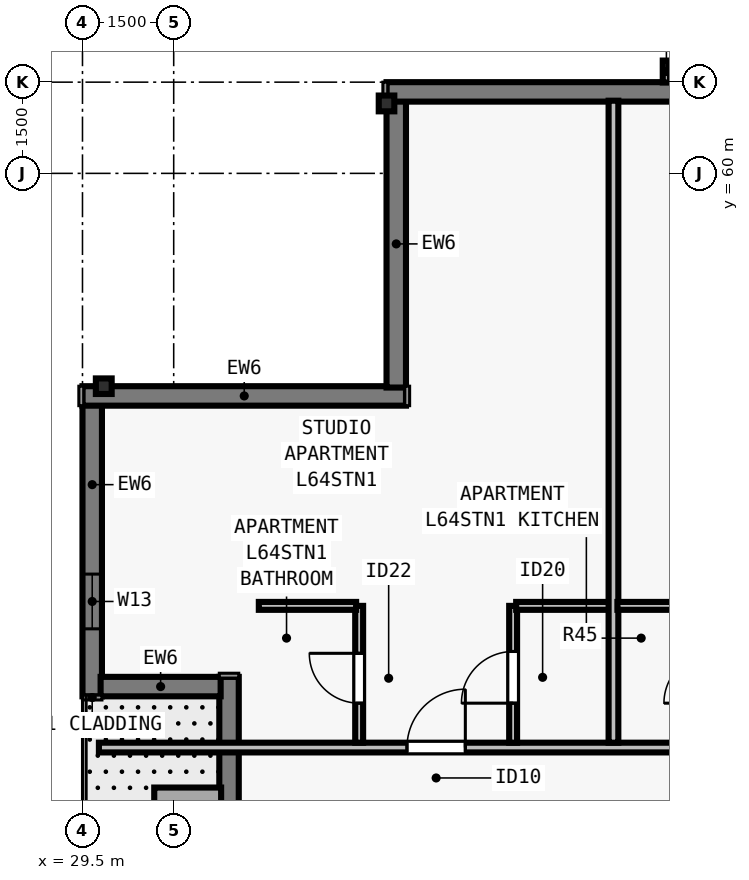
"""IFC4 building model, lengths in metres.
Left out: names, types, materials, properties, quantities, classifications, styles, units other than length and angle.
Written with IfcOpenShell. Run it as: python <this file> out.ifc"""

import sys

from ifc_helpers import new_model, si_unit, direction, frame, frame_2d, origin, origin_2d, place, context, subcontext, project, spatial, rectangle, i_section, extrude, element, fill, save


model = new_model("IFC4")
c1 = context("Model", 3, precision=1e-05, world=origin(), true_north=direction((0.0, 1.0)))
c2 = subcontext(c1, "Body", "Model", "MODEL_VIEW")
j1 = project(units=[si_unit("LENGTHUNIT", "METRE"), si_unit("PLANEANGLEUNIT", "RADIAN")], contexts=[c1])
p1 = place(None, origin())
s1 = spatial("IfcSite", under=j1, at=p1, CompositionType="ELEMENT")
p2 = place(p1, origin())
s2 = spatial("IfcBuilding", under=s1, at=p2, CompositionType="ELEMENT")
p3 = place(p2, frame((0.0, 0.0, 234.0)))
s3 = spatial("IfcBuildingStorey", under=s2, at=p3, CompositionType="ELEMENT", Elevation=234.0)
for number, where, z_axis, x_axis in (
    (1, (34.5, 61.15, 0.0), (0.0, 0.0, 1.0), (1.0, 0.0, 0.0)),
    (2, (29.85, 56.5, 0.0), (0.0, 0.0, 1.0), (0.0, 1.0, 0.0)),
):
    element("IfcColumn", number, at=place(p3, frame(where, z_axis=z_axis, x_axis=x_axis)), inside=s3, PredefinedType="COLUMN", context=c2, shape_type="SweptSolid", body=[
        extrude(i_section(OverallWidth=0.256, OverallDepth=0.26, WebThickness=0.01, FlangeThickness=0.017, FilletRadius=0.013, at=origin_2d()), origin(), (0.0, 0.0, 1.0), 3.5),
    ])
p4 = place(p3, frame((29.66, 51.4, 0.0), z_axis=(0.0, 0.0, 1.0), x_axis=(0.0, 1.0, 0.0)))
e3 = element("IfcWall", 3, at=p4, inside=s3, PredefinedType="SOLIDWALL", context=c2, shape_type="SweptSolid", body=[
    extrude(rectangle(XDim=4.802, YDim=0.32, at=frame_2d((2.401, 0.0))), origin(), (0.0, 0.0, 1.0), 3.29),
])
p5 = place(p4, frame((1.11, 0.0, 0.8)))
e4 = element("IfcOpeningElement", 4, at=p5, cuts=e3, PredefinedType="OPENING", context=c2, shape_type="SweptSolid", body=[
    extrude(rectangle(XDim=0.9, YDim=1.678, at=frame_2d((0.45, 0.839))), frame((0.0, 0.17, 0.0), z_axis=(0.0, -1.0, 0.0), x_axis=(1.0, 0.0, 0.0)), (0.0, 0.0, 1.0), 0.34),
])
p6 = place(p3, frame((29.5, 56.34, 0.0), z_axis=(0.0, 0.0, 1.0), x_axis=(1.0, 0.0, 0.0)))
e5 = element("IfcWall", 5, at=p6, inside=s3, PredefinedType="SOLIDWALL", context=c2, shape_type="SweptSolid", body=[
    extrude(rectangle(XDim=5.32, YDim=0.32, at=frame_2d((2.66, 0.0))), origin(), (0.0, 0.0, 1.0), 3.29),
])
p7 = place(p3, frame((34.66, 56.478, 0.0), z_axis=(0.0, 0.0, 1.0), x_axis=(0.0, 1.0, 0.0)))
e6 = element("IfcWall", 6, at=p7, inside=s3, PredefinedType="SOLIDWALL", context=c2, shape_type="SweptSolid", body=[
    extrude(rectangle(XDim=4.724, YDim=0.32, at=frame_2d((2.362, 0.0))), origin(), (0.0, 0.0, 1.0), 3.29),
])
p8 = place(p3, frame((34.5, 61.34, 0.0), z_axis=(0.0, 0.0, 1.0), x_axis=(1.0, 0.0, 0.0)))
e7 = element("IfcWall", 7, at=p8, inside=s3, PredefinedType="SOLIDWALL", context=c2, shape_type="SweptSolid", body=[
    extrude(rectangle(XDim=34.702, YDim=0.32, at=frame_2d((17.351, 0.0))), origin(), (0.0, 0.0, 1.0), 3.29),
])
p9 = place(p8, frame((4.763, 0.0, 0.8)))
e8 = element("IfcOpeningElement", 8, at=p9, cuts=e7, PredefinedType="OPENING", context=c2, shape_type="SweptSolid", body=[
    extrude(rectangle(XDim=1.55, YDim=1.678, at=frame_2d((0.775, 0.839))), frame((0.0, 0.17, 0.0), z_axis=(0.0, -1.0, 0.0), x_axis=(1.0, 0.0, 0.0)), (0.0, 0.0, 1.0), 0.34),
])
p10 = place(p8, frame((7.988, 0.0, 0.8)))
e9 = element("IfcOpeningElement", 9, at=p10, cuts=e7, PredefinedType="OPENING", context=c2, shape_type="SweptSolid", body=[
    extrude(rectangle(XDim=1.85, YDim=1.678, at=frame_2d((0.925, 0.839))), frame((0.0, 0.17, 0.0), z_axis=(0.0, -1.0, 0.0), x_axis=(1.0, 0.0, 0.0)), (0.0, 0.0, 1.0), 0.34),
])
p11 = place(p8, frame((10.263, 0.0, 0.8)))
e10 = element("IfcOpeningElement", 10, at=p11, cuts=e7, PredefinedType="OPENING", context=c2, shape_type="SweptSolid", body=[
    extrude(rectangle(XDim=1.55, YDim=1.678, at=frame_2d((0.775, 0.839))), frame((0.0, 0.17, 0.0), z_axis=(0.0, -1.0, 0.0), x_axis=(1.0, 0.0, 0.0)), (0.0, 0.0, 1.0), 0.34),
])
p12 = place(p8, frame((14.738, 0.0, 0.8)))
e11 = element("IfcOpeningElement", 11, at=p12, cuts=e7, PredefinedType="OPENING", context=c2, shape_type="SweptSolid", body=[
    extrude(rectangle(XDim=1.85, YDim=1.678, at=frame_2d((0.925, 0.839))), frame((0.0, 0.17, 0.0), z_axis=(0.0, -1.0, 0.0), x_axis=(1.0, 0.0, 0.0)), (0.0, 0.0, 1.0), 0.34),
])
p13 = place(p8, frame((18.264, 0.0, 0.8)))
e12 = element("IfcOpeningElement", 12, at=p13, cuts=e7, PredefinedType="OPENING", context=c2, shape_type="SweptSolid", body=[
    extrude(rectangle(XDim=1.55, YDim=1.678, at=frame_2d((0.775, 0.839))), frame((0.0, 0.17, 0.0), z_axis=(0.0, -1.0, 0.0), x_axis=(1.0, 0.0, 0.0)), (0.0, 0.0, 1.0), 0.34),
])
p14 = place(p8, frame((25.014, 0.0, 0.8)))
e13 = element("IfcOpeningElement", 13, at=p14, cuts=e7, PredefinedType="OPENING", context=c2, shape_type="SweptSolid", body=[
    extrude(rectangle(XDim=1.55, YDim=1.678, at=frame_2d((0.775, 0.839))), frame((0.0, 0.17, 0.0), z_axis=(0.0, -1.0, 0.0), x_axis=(1.0, 0.0, 0.0)), (0.0, 0.0, 1.0), 0.34),
])
p15 = place(p8, frame((28.24, 0.0, 0.8)))
e14 = element("IfcOpeningElement", 14, at=p15, cuts=e7, PredefinedType="OPENING", context=c2, shape_type="SweptSolid", body=[
    extrude(rectangle(XDim=1.85, YDim=1.678, at=frame_2d((0.925, 0.839))), frame((0.0, 0.17, 0.0), z_axis=(0.0, -1.0, 0.0), x_axis=(1.0, 0.0, 0.0)), (0.0, 0.0, 1.0), 0.34),
])
p16 = place(p3, frame((31.91, 45.978, 0.0), z_axis=(0.0, 0.0, 1.0), x_axis=(0.0, 1.0, 0.0)))
e15 = element("IfcWall", 15, at=p16, inside=s3, PredefinedType="SOLIDWALL", context=c2, shape_type="SweptSolid", body=[
    extrude(rectangle(XDim=5.742, YDim=0.32, at=frame_2d((2.871, 0.0))), origin(), (0.0, 0.0, 1.0), 3.29),
])
p17 = place(p16, frame((2.601, 0.0, 0.0)))
e16 = element("IfcOpeningElement", 16, at=p17, cuts=e15, PredefinedType="OPENING", context=c2, shape_type="SweptSolid", body=[
    extrude(rectangle(XDim=1.0, YDim=2.15, at=frame_2d((0.5, 1.075))), frame((0.0, 0.17, 0.0), z_axis=(0.0, -1.0, 0.0), x_axis=(1.0, 0.0, 0.0)), (0.0, 0.0, 1.0), 0.34),
])
p18 = place(p3, frame((31.772, 51.56, 0.0), z_axis=(0.0, 0.0, 1.0), x_axis=(-1.0, 0.0, 0.0)))
e17 = element("IfcWall", 17, at=p18, inside=s3, PredefinedType="SOLIDWALL", context=c2, shape_type="SweptSolid", body=[
    extrude(rectangle(XDim=1.974, YDim=0.32, at=frame_2d((0.987, 0.0))), origin(), (0.0, 0.0, 1.0), 3.29),
])
p19 = place(p3, frame((29.77, 50.558, 0.0), z_axis=(0.0, 0.0, 1.0), x_axis=(1.0, 0.0, 0.0)))
e18 = element("IfcWall", 18, at=p19, inside=s3, PredefinedType="PARTITIONING", context=c2, shape_type="SweptSolid", body=[
    extrude(rectangle(XDim=44.425, YDim=0.16, at=frame_2d((22.212, 0.0))), origin(), (0.0, 0.0, 1.0), 2.958),
])
p20 = place(p19, frame((5.066, 0.0, 0.0)))
e19 = element("IfcOpeningElement", 19, at=p20, cuts=e18, PredefinedType="OPENING", context=c2, shape_type="SweptSolid", body=[
    extrude(rectangle(XDim=0.96, YDim=2.18, at=frame_2d((0.48, 1.09))), frame((0.0, 0.09, 0.0), z_axis=(0.0, -1.0, 0.0), x_axis=(1.0, 0.0, 0.0)), (0.0, 0.0, 1.0), 0.18),
])
p21 = place(p19, frame((12.838, 0.0, 0.0)))
e20 = element("IfcOpeningElement", 20, at=p21, cuts=e18, PredefinedType="OPENING", context=c2, shape_type="SweptSolid", body=[
    extrude(rectangle(XDim=0.96, YDim=2.18, at=frame_2d((0.48, 1.09))), frame((0.0, 0.09, 0.0), z_axis=(0.0, -1.0, 0.0), x_axis=(1.0, 0.0, 0.0)), (0.0, 0.0, 1.0), 0.18),
])
p22 = place(p19, frame((21.67, 0.0, 0.0)))
e21 = element("IfcOpeningElement", 21, at=p22, cuts=e18, PredefinedType="OPENING", context=c2, shape_type="SweptSolid", body=[
    extrude(rectangle(XDim=0.96, YDim=2.18, at=frame_2d((0.48, 1.09))), frame((0.0, 0.09, 0.0), z_axis=(0.0, -1.0, 0.0), x_axis=(1.0, 0.0, 0.0)), (0.0, 0.0, 1.0), 0.18),
])
p23 = place(p19, frame((30.502, 0.0, 0.0)))
e22 = element("IfcOpeningElement", 22, at=p23, cuts=e18, PredefinedType="OPENING", context=c2, shape_type="SweptSolid", body=[
    extrude(rectangle(XDim=0.96, YDim=2.18, at=frame_2d((0.48, 1.09))), frame((0.0, 0.09, 0.0), z_axis=(0.0, -1.0, 0.0), x_axis=(1.0, 0.0, 0.0)), (0.0, 0.0, 1.0), 0.18),
])
p24 = place(p19, frame((39.594, 0.0, 0.0)))
e23 = element("IfcOpeningElement", 23, at=p24, cuts=e18, PredefinedType="OPENING", context=c2, shape_type="SweptSolid", body=[
    extrude(rectangle(XDim=0.96, YDim=2.18, at=frame_2d((0.48, 1.09))), frame((0.0, 0.09, 0.0), z_axis=(0.0, -1.0, 0.0), x_axis=(1.0, 0.0, 0.0)), (0.0, 0.0, 1.0), 0.18),
])
p25 = place(p3, frame((34.05, 50.637, 0.0), z_axis=(0.0, 0.0, 1.0), x_axis=(0.0, 1.0, 0.0)))
e24 = element("IfcWall", 24, at=p25, inside=s3, PredefinedType="PLUMBINGWALL", context=c2, shape_type="SweptSolid", body=[
    extrude(rectangle(XDim=2.25, YDim=0.13, at=frame_2d((1.125, 0.0))), origin(), (0.0, 0.0, 1.0), 3.29),
])
p26 = place(p25, frame((0.65, 0.0, 0.0)))
e25 = element("IfcOpeningElement", 25, at=p26, cuts=e24, PredefinedType="OPENING", context=c2, shape_type="SweptSolid", body=[
    extrude(rectangle(XDim=0.82, YDim=2.1, at=frame_2d((0.41, 1.05))), frame((0.0, 0.075, 0.0), z_axis=(0.0, -1.0, 0.0), x_axis=(1.0, 0.0, 0.0)), (0.0, 0.0, 1.0), 0.15),
])
p27 = place(p3, frame((32.4, 52.887, 0.0), z_axis=(0.0, 0.0, 1.0), x_axis=(1.0, 0.0, 0.0)))
e26 = element("IfcWall", 26, at=p27, inside=s3, PredefinedType="PLUMBINGWALL", context=c2, shape_type="SweptSolid", body=[
    extrude(rectangle(XDim=1.6, YDim=0.13, at=frame_2d((0.8, 0.0))), origin(), (0.0, 0.0, 1.0), 3.29),
])
p28 = place(p3, frame((36.582, 50.637, 0.0), z_axis=(0.0, 0.0, 1.0), x_axis=(0.0, 1.0, 0.0)))
e27 = element("IfcWall", 27, at=p28, inside=s3, PredefinedType="PLUMBINGWALL", context=c2, shape_type="SweptSolid", body=[
    extrude(rectangle(XDim=2.25, YDim=0.13, at=frame_2d((1.125, 0.0))), origin(), (0.0, 0.0, 1.0), 3.29),
])
p29 = place(p28, frame((0.65, 0.0, 0.0)))
e28 = element("IfcOpeningElement", 28, at=p29, cuts=e27, PredefinedType="OPENING", context=c2, shape_type="SweptSolid", body=[
    extrude(rectangle(XDim=0.85, YDim=2.1, at=frame_2d((0.425, 1.05))), frame((0.0, 0.075, 0.0), z_axis=(0.0, -1.0, 0.0), x_axis=(1.0, 0.0, 0.0)), (0.0, 0.0, 1.0), 0.15),
])
p30 = place(p3, frame((36.632, 52.887, 0.0), z_axis=(0.0, 0.0, 1.0), x_axis=(1.0, 0.0, 0.0)))
e29 = element("IfcWall", 29, at=p30, inside=s3, PredefinedType="PLUMBINGWALL", context=c2, shape_type="SweptSolid", body=[
    extrude(rectangle(XDim=1.6, YDim=0.13, at=frame_2d((0.8, 0.0))), origin(), (0.0, 0.0, 1.0), 3.29),
])
p31 = place(p3, frame((38.232, 50.637, 0.0), z_axis=(0.0, 0.0, 1.0), x_axis=(0.0, 1.0, 0.0)))
e30 = element("IfcWall", 30, at=p31, inside=s3, PredefinedType="PARTITIONING", context=c2, shape_type="SweptSolid", body=[
    extrude(rectangle(XDim=10.558, YDim=0.16, at=frame_2d((5.279, 0.0))), origin(), (0.0, 0.0, 1.0), 2.573),
])
p32 = place(p3, frame((38.297, 52.887, 0.0), z_axis=(0.0, 0.0, 1.0), x_axis=(1.0, 0.0, 0.0)))
e31 = element("IfcWall", 31, at=p32, inside=s3, PredefinedType="PLUMBINGWALL", context=c2, shape_type="SweptSolid", body=[
    extrude(rectangle(XDim=1.535, YDim=0.13, at=frame_2d((0.768, 0.0))), origin(), (0.0, 0.0, 1.0), 3.29),
])
p33 = place(p5, origin())
e32 = element("IfcWindow", 32, at=p33, inside=s3, PartitioningType="SINGLE_PANEL", PredefinedType="WINDOW", context=c2, shape_type="SweptSolid", body=[
    extrude(rectangle(XDim=0.9, YDim=1.678, at=frame_2d((0.45, 0.839))), frame((0.0, -0.04, 0.0), z_axis=(0.0, -1.0, 0.0), x_axis=(1.0, 0.0, 0.0)), (0.0, 0.0, 1.0), 0.06),
])
fill(e4, e32)
p34 = place(p26, origin())
e33 = element("IfcDoor", 33, at=p34, inside=s3, OperationType="SINGLE_SWING_RIGHT", PredefinedType="DOOR", context=c2, shape_type="SweptSolid", body=[
    extrude(rectangle(XDim=0.82, YDim=2.1, at=frame_2d((0.41, 1.05))), frame((0.0, 0.025, 0.0), z_axis=(0.0, -1.0, 0.0), x_axis=(1.0, 0.0, 0.0)), (0.0, 0.0, 1.0), 0.05),
])
fill(e25, e33)
p35 = place(p29, origin())
e34 = element("IfcDoor", 34, at=p35, inside=s3, OperationType="SINGLE_SWING_LEFT", PredefinedType="DOOR", context=c2, shape_type="SweptSolid", body=[
    extrude(rectangle(XDim=0.85, YDim=2.1, at=frame_2d((0.425, 1.05))), frame((0.0, 0.025, 0.0), z_axis=(0.0, -1.0, 0.0), x_axis=(1.0, 0.0, 0.0)), (0.0, 0.0, 1.0), 0.05),
])
fill(e28, e34)
p36 = place(p20, origin())
e35 = element("IfcDoor", 35, at=p36, inside=s3, OperationType="SINGLE_SWING_RIGHT", PredefinedType="DOOR", context=c2, shape_type="SweptSolid", body=[
    extrude(rectangle(XDim=0.96, YDim=2.18, at=frame_2d((0.48, 1.09))), frame((0.0, 0.025, 0.0), z_axis=(0.0, -1.0, 0.0), x_axis=(1.0, 0.0, 0.0)), (0.0, 0.0, 1.0), 0.05),
])
fill(e19, e35)
save(model, sys.argv[1])
